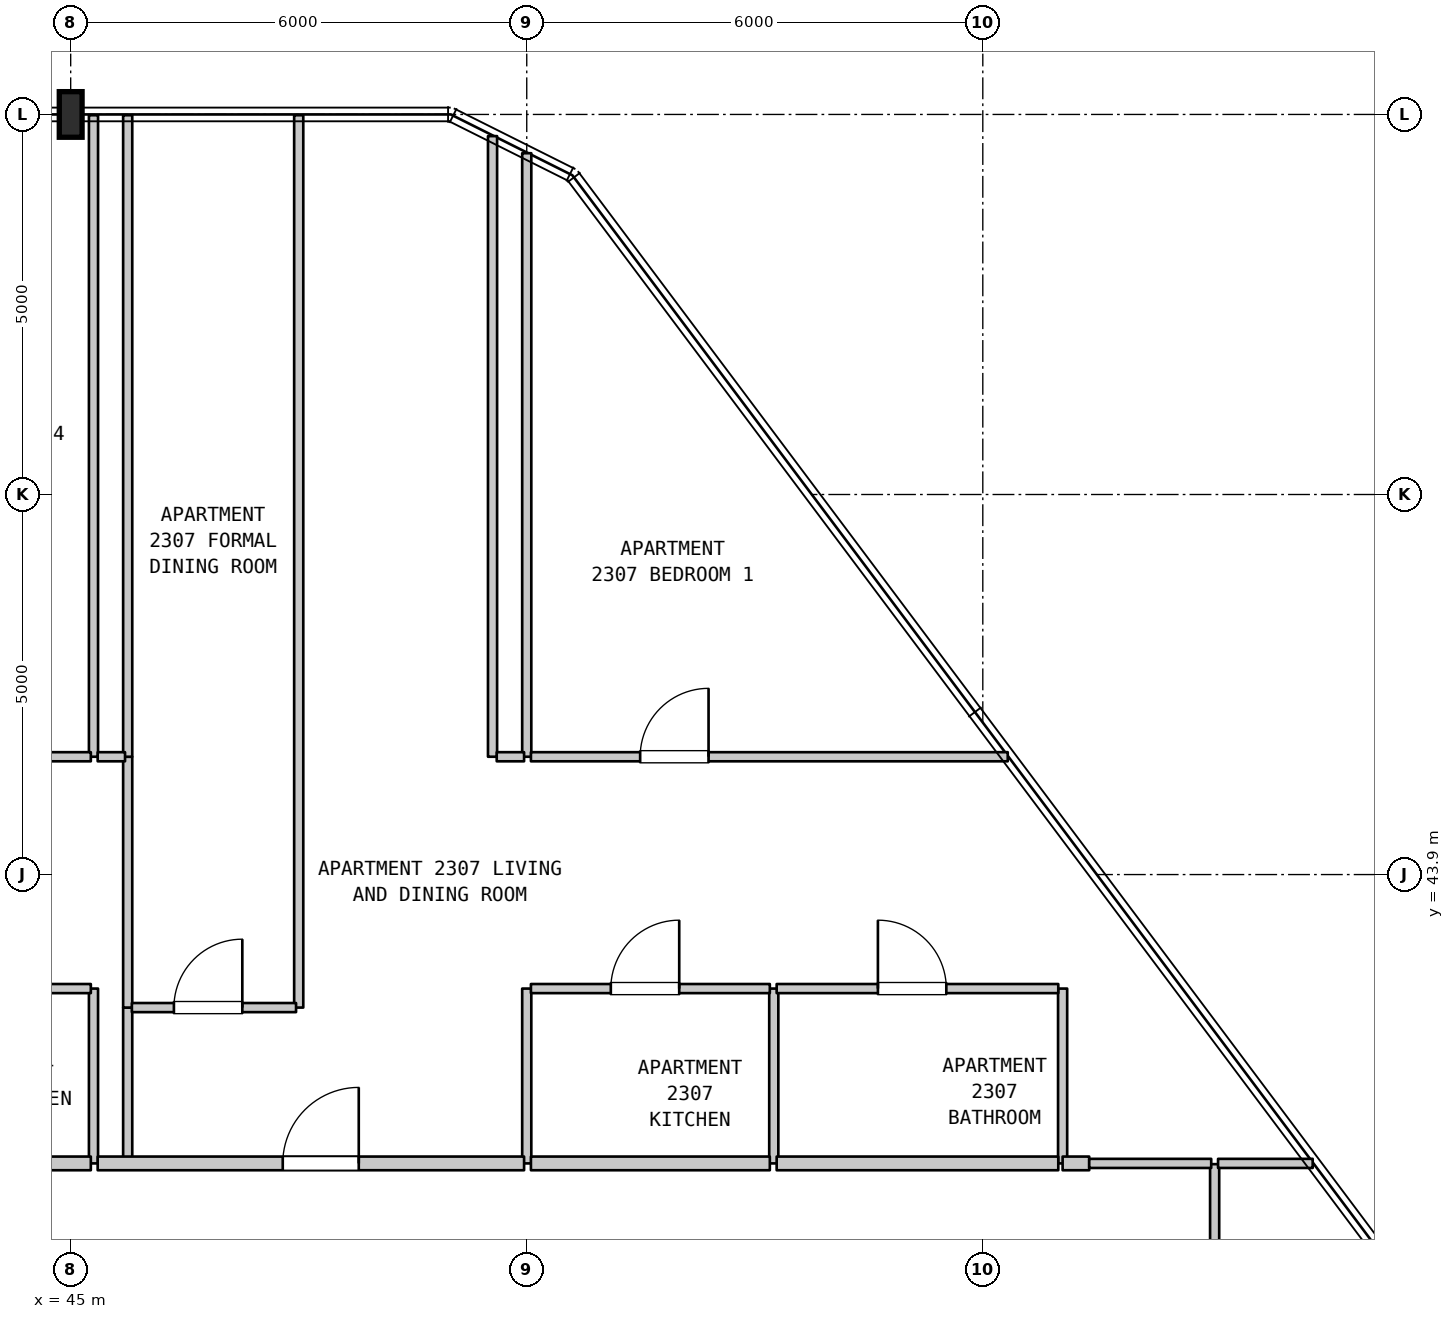
"""IFC4 building model, lengths in metres.
Left out: names, types, materials, properties, quantities, classifications, styles, units other than length and angle.
Written with IfcOpenShell. Run it as: python <this file> out.ifc"""

import sys

from ifc_helpers import new_model, si_unit, direction, frame, frame_2d, origin, origin_2d, place, context, subcontext, project, spatial, rectangle, i_section, extrude, element, fill, save


model = new_model("IFC4")
c1 = context("Model", 3, precision=1e-05, world=origin(), true_north=direction((0.0, 1.0)))
c2 = subcontext(c1, "Body", "Model", "MODEL_VIEW")
j1 = project(units=[si_unit("LENGTHUNIT", "METRE"), si_unit("PLANEANGLEUNIT", "RADIAN")], contexts=[c1])
p1 = place(None, origin())
s1 = spatial("IfcSite", under=j1, at=p1, CompositionType="ELEMENT")
p2 = place(p1, origin())
s2 = spatial("IfcBuilding", under=s1, at=p2, CompositionType="ELEMENT")
p3 = place(p2, frame((0.0, 0.0, 98.3)))
s3 = spatial("IfcBuildingStorey", under=s2, at=p3, CompositionType="ELEMENT", Elevation=98.3)
p4 = place(p3, frame((45.0, 53.9, 0.0), z_axis=(0.0, 0.0, 1.0), x_axis=(1.0, 0.0, 0.0)))
e1 = element("IfcColumn", 1, at=p4, inside=s3, PredefinedType="COLUMN", context=c2, shape_type="SweptSolid", body=[
    extrude(i_section(OverallWidth=0.3, OverallDepth=0.6, WebThickness=0.015, FlangeThickness=0.03, FilletRadius=0.027, at=origin_2d()), origin(), (0.0, 0.0, 1.0), 3.7),
])
p5 = place(p3, frame((45.3, 40.1, 0.0), z_axis=(0.0, 0.0, 1.0), x_axis=(0.0, 1.0, 0.0)))
e2 = element("IfcWall", 2, at=p5, inside=s3, PredefinedType="PARTITIONING", context=c2, shape_type="SweptSolid", body=[
    extrude(rectangle(XDim=2.3, YDim=0.12, at=frame_2d((1.15, 0.0))), origin(), (0.0, 0.0, 1.0), 3.385),
])
p6 = place(p3, frame((45.3, 45.45, 0.0), z_axis=(0.0, 0.0, 1.0), x_axis=(0.0, 1.0, 0.0)))
e3 = element("IfcWall", 3, at=p6, inside=s3, PredefinedType="PARTITIONING", context=c2, shape_type="SweptSolid", body=[
    extrude(rectangle(XDim=8.44, YDim=0.12, at=frame_2d((4.22, 0.0))), origin(), (0.0, 0.0, 1.0), 3.385),
])
p7 = place(p3, frame((45.75, 40.1, 0.0), z_axis=(0.0, 0.0, 1.0), x_axis=(0.0, 1.0, 0.0)))
e4 = element("IfcWall", 4, at=p7, inside=s3, PredefinedType="PARTITIONING", context=c2, shape_type="SweptSolid", body=[
    extrude(rectangle(XDim=2.05, YDim=0.12, at=frame_2d((1.025, 0.0))), origin(), (0.0, 0.0, 1.0), 3.385),
])
p8 = place(p3, frame((45.75, 42.15, 0.0), z_axis=(0.0, 0.0, 1.0), x_axis=(0.0, 1.0, 0.0)))
e5 = element("IfcWall", 5, at=p8, inside=s3, PredefinedType="PARTITIONING", context=c2, shape_type="SweptSolid", body=[
    extrude(rectangle(XDim=3.3, YDim=0.12, at=frame_2d((1.65, 0.0))), origin(), (0.0, 0.0, 1.0), 3.385),
])
p9 = place(p3, frame((45.75, 45.45, 0.0), z_axis=(0.0, 0.0, 1.0), x_axis=(0.0, 1.0, 0.0)))
e6 = element("IfcWall", 6, at=p9, inside=s3, PredefinedType="PARTITIONING", context=c2, shape_type="SweptSolid", body=[
    extrude(rectangle(XDim=8.44, YDim=0.12, at=frame_2d((4.22, 0.0))), origin(), (0.0, 0.0, 1.0), 3.385),
])
p10 = place(p3, frame((48.0, 42.15, 0.0), z_axis=(0.0, 0.0, 1.0), x_axis=(0.0, 1.0, 0.0)))
e7 = element("IfcWall", 7, at=p10, inside=s3, PredefinedType="PARTITIONING", context=c2, shape_type="SweptSolid", body=[
    extrude(rectangle(XDim=11.74, YDim=0.12, at=frame_2d((5.87, 0.0))), origin(), (0.0, 0.0, 1.0), 3.385),
])
p11 = place(p3, frame((50.55, 45.45, 0.0), z_axis=(0.0, 0.0, 1.0), x_axis=(0.0, 1.0, 0.0)))
e8 = element("IfcWall", 8, at=p11, inside=s3, PredefinedType="PARTITIONING", context=c2, shape_type="SweptSolid", body=[
    extrude(rectangle(XDim=8.165, YDim=0.12, at=frame_2d((4.083, 0.0))), origin(), (0.0, 0.0, 1.0), 3.385),
])
p12 = place(p3, frame((51.0, 40.1, 0.0), z_axis=(0.0, 0.0, 1.0), x_axis=(0.0, 1.0, 0.0)))
e9 = element("IfcWall", 9, at=p12, inside=s3, PredefinedType="PARTITIONING", context=c2, shape_type="SweptSolid", body=[
    extrude(rectangle(XDim=2.3, YDim=0.12, at=frame_2d((1.15, 0.0))), origin(), (0.0, 0.0, 1.0), 3.385),
])
p13 = place(p3, frame((51.0, 45.45, 0.0), z_axis=(0.0, 0.0, 1.0), x_axis=(0.0, 1.0, 0.0)))
e10 = element("IfcWall", 10, at=p13, inside=s3, PredefinedType="PARTITIONING", context=c2, shape_type="SweptSolid", body=[
    extrude(rectangle(XDim=7.94, YDim=0.12, at=frame_2d((3.97, 0.0))), origin(), (0.0, 0.0, 1.0), 3.385),
])
for number, where, z_axis, x_axis in (
    (11, (54.25, 40.1, 0.0), (0.0, 0.0, 1.0), (0.0, 1.0, 0.0)),
    (12, (58.05, 40.1, 0.0), (0.0, 0.0, 1.0), (0.0, 1.0, 0.0)),
):
    element("IfcWall", number, at=place(p3, frame(where, z_axis=z_axis, x_axis=x_axis)), inside=s3, PredefinedType="PARTITIONING", context=c2, shape_type="SweptSolid", body=[
        extrude(rectangle(XDim=2.3, YDim=0.12, at=frame_2d((1.15, 0.0))), origin(), (0.0, 0.0, 1.0), 3.385),
    ])
p14 = place(p3, frame((60.05, 37.89, 0.0), z_axis=(0.0, 0.0, 1.0), x_axis=(0.0, 1.0, 0.0)))
e13 = element("IfcWall", 13, at=p14, inside=s3, PredefinedType="PARTITIONING", context=c2, shape_type="SweptSolid", body=[
    extrude(rectangle(XDim=2.2, YDim=0.12, at=frame_2d((1.1, 0.0))), origin(), (0.0, 0.0, 1.0), 3.385),
])
p15 = place(p3, frame((40.968, 40.1, 0.0), z_axis=(0.0, 0.0, 1.0), x_axis=(1.0, 0.0, 0.0)))
e14 = element("IfcWall", 14, at=p15, inside=s3, PredefinedType="STANDARD", context=c2, shape_type="SweptSolid", body=[
    extrude(rectangle(XDim=4.297, YDim=0.18, at=frame_2d((2.148, 0.0))), origin(), (0.0, 0.0, 1.0), 3.385),
])
p16 = place(p3, frame((45.355, 40.1, 0.0), z_axis=(0.0, 0.0, 1.0), x_axis=(1.0, 0.0, 0.0)))
e15 = element("IfcWall", 15, at=p16, inside=s3, PredefinedType="STANDARD", context=c2, shape_type="SweptSolid", body=[
    extrude(rectangle(XDim=5.61, YDim=0.18, at=frame_2d((2.805, 0.0))), origin(), (0.0, 0.0, 1.0), 3.385),
])
p17 = place(p16, frame((2.435, 0.0, 0.0)))
e16 = element("IfcOpeningElement", 16, at=p17, cuts=e15, PredefinedType="OPENING", context=c2, shape_type="SweptSolid", body=[
    extrude(rectangle(XDim=1.0, YDim=2.15, at=frame_2d((0.5, 1.075))), frame((0.0, 0.1, 0.0), z_axis=(0.0, -1.0, 0.0), x_axis=(1.0, 0.0, 0.0)), (0.0, 0.0, 1.0), 0.2),
])
p18 = place(p3, frame((51.055, 40.1, 0.0), z_axis=(0.0, 0.0, 1.0), x_axis=(1.0, 0.0, 0.0)))
e17 = element("IfcWall", 17, at=p18, inside=s3, PredefinedType="STANDARD", context=c2, shape_type="SweptSolid", body=[
    extrude(rectangle(XDim=3.143, YDim=0.18, at=frame_2d((1.572, 0.0))), origin(), (0.0, 0.0, 1.0), 3.385),
])
p19 = place(p3, frame((54.288, 40.1, 0.0), z_axis=(0.0, 0.0, 1.0), x_axis=(1.0, 0.0, 0.0)))
e18 = element("IfcWall", 18, at=p19, inside=s3, PredefinedType="STANDARD", context=c2, shape_type="SweptSolid", body=[
    extrude(rectangle(XDim=3.705, YDim=0.18, at=frame_2d((1.853, 0.0))), origin(), (0.0, 0.0, 1.0), 3.385),
])
p20 = place(p3, frame((58.05, 40.1, 0.0), z_axis=(0.0, 0.0, 1.0), x_axis=(1.0, 0.0, 0.0)))
e19 = element("IfcWall", 19, at=p20, inside=s3, PredefinedType="STANDARD", context=c2, shape_type="SweptSolid", body=[
    extrude(rectangle(XDim=0.35, YDim=0.18, at=frame_2d((0.175, 0.0))), origin(), (0.0, 0.0, 1.0), 3.385),
])
p21 = place(p3, frame((58.4, 40.1, 0.0), z_axis=(0.0, 0.0, 1.0), x_axis=(1.0, 0.0, 0.0)))
e20 = element("IfcWall", 20, at=p21, inside=s3, PredefinedType="PARTITIONING", context=c2, shape_type="SweptSolid", body=[
    extrude(rectangle(XDim=1.605, YDim=0.12, at=frame_2d((0.802, 0.0))), origin(), (0.0, 0.0, 1.0), 3.385),
])
p22 = place(p3, frame((60.095, 40.1, 0.0), z_axis=(0.0, 0.0, 1.0), x_axis=(1.0, 0.0, 0.0)))
e21 = element("IfcWall", 21, at=p22, inside=s3, PredefinedType="PARTITIONING", context=c2, shape_type="SweptSolid", body=[
    extrude(rectangle(XDim=1.245, YDim=0.12, at=frame_2d((0.623, 0.0))), origin(), (0.0, 0.0, 1.0), 3.385),
])
p23 = place(p3, frame((45.805, 42.15, 0.0), z_axis=(0.0, 0.0, 1.0), x_axis=(1.0, 0.0, 0.0)))
e22 = element("IfcWall", 22, at=p23, inside=s3, PredefinedType="PARTITIONING", context=c2, shape_type="SweptSolid", body=[
    extrude(rectangle(XDim=2.16, YDim=0.12, at=frame_2d((1.08, 0.0))), origin(), (0.0, 0.0, 1.0), 3.385),
])
p24 = place(p23, frame((0.553, 0.0, 0.0)))
e23 = element("IfcOpeningElement", 23, at=p24, cuts=e22, PredefinedType="OPENING", context=c2, shape_type="SweptSolid", body=[
    extrude(rectangle(XDim=0.9, YDim=2.15, at=frame_2d((0.45, 1.075))), frame((0.0, 0.07, 0.0), z_axis=(0.0, -1.0, 0.0), x_axis=(1.0, 0.0, 0.0)), (0.0, 0.0, 1.0), 0.14),
])
p25 = place(p3, frame((40.968, 42.4, 0.0), z_axis=(0.0, 0.0, 1.0), x_axis=(1.0, 0.0, 0.0)))
e24 = element("IfcWall", 24, at=p25, inside=s3, PredefinedType="PARTITIONING", context=c2, shape_type="SweptSolid", body=[
    extrude(rectangle(XDim=4.297, YDim=0.12, at=frame_2d((2.148, 0.0))), origin(), (0.0, 0.0, 1.0), 3.385),
])
p26 = place(p25, frame((1.627, 0.0, 0.0)))
e25 = element("IfcOpeningElement", 25, at=p26, cuts=e24, PredefinedType="OPENING", context=c2, shape_type="SweptSolid", body=[
    extrude(rectangle(XDim=0.9, YDim=2.15, at=frame_2d((0.45, 1.075))), frame((0.0, 0.07, 0.0), z_axis=(0.0, -1.0, 0.0), x_axis=(1.0, 0.0, 0.0)), (0.0, 0.0, 1.0), 0.14),
])
p27 = place(p3, frame((51.055, 42.4, 0.0), z_axis=(0.0, 0.0, 1.0), x_axis=(1.0, 0.0, 0.0)))
e26 = element("IfcWall", 26, at=p27, inside=s3, PredefinedType="PARTITIONING", context=c2, shape_type="SweptSolid", body=[
    extrude(rectangle(XDim=3.143, YDim=0.12, at=frame_2d((1.572, 0.0))), origin(), (0.0, 0.0, 1.0), 3.385),
])
p28 = place(p27, frame((1.051, 0.0, 0.0)))
e27 = element("IfcOpeningElement", 27, at=p28, cuts=e26, PredefinedType="OPENING", context=c2, shape_type="SweptSolid", body=[
    extrude(rectangle(XDim=0.9, YDim=2.15, at=frame_2d((0.45, 1.075))), frame((0.0, 0.07, 0.0), z_axis=(0.0, -1.0, 0.0), x_axis=(1.0, 0.0, 0.0)), (0.0, 0.0, 1.0), 0.14),
])
p29 = place(p3, frame((54.288, 42.4, 0.0), z_axis=(0.0, 0.0, 1.0), x_axis=(1.0, 0.0, 0.0)))
e28 = element("IfcWall", 28, at=p29, inside=s3, PredefinedType="PARTITIONING", context=c2, shape_type="SweptSolid", body=[
    extrude(rectangle(XDim=3.705, YDim=0.12, at=frame_2d((1.853, 0.0))), origin(), (0.0, 0.0, 1.0), 3.385),
])
p30 = place(p29, frame((1.332, 0.0, 0.0)))
e29 = element("IfcOpeningElement", 29, at=p30, cuts=e28, PredefinedType="OPENING", context=c2, shape_type="SweptSolid", body=[
    extrude(rectangle(XDim=0.9, YDim=2.1, at=frame_2d((0.45, 1.05))), frame((0.0, 0.07, 0.0), z_axis=(0.0, -1.0, 0.0), x_axis=(1.0, 0.0, 0.0)), (0.0, 0.0, 1.0), 0.14),
])
p31 = place(p3, frame((33.625, 45.45, 0.0), z_axis=(0.0, 0.0, 1.0), x_axis=(1.0, 0.0, 0.0)))
e30 = element("IfcWall", 30, at=p31, inside=s3, PredefinedType="PARTITIONING", context=c2, shape_type="SweptSolid", body=[
    extrude(rectangle(XDim=11.64, YDim=0.12, at=frame_2d((5.82, 0.0))), origin(), (0.0, 0.0, 1.0), 3.385),
])
p32 = place(p31, frame((1.146, 0.0, 0.0)))
e31 = element("IfcOpeningElement", 31, at=p32, cuts=e30, PredefinedType="OPENING", context=c2, shape_type="SweptSolid", body=[
    extrude(rectangle(XDim=0.9, YDim=2.15, at=frame_2d((0.45, 1.075))), frame((0.0, 0.07, 0.0), z_axis=(0.0, -1.0, 0.0), x_axis=(1.0, 0.0, 0.0)), (0.0, 0.0, 1.0), 0.14),
])
p33 = place(p31, frame((3.834, 0.0, 0.0)))
e32 = element("IfcOpeningElement", 32, at=p33, cuts=e30, PredefinedType="OPENING", context=c2, shape_type="SweptSolid", body=[
    extrude(rectangle(XDim=0.9, YDim=2.15, at=frame_2d((0.45, 1.075))), frame((0.0, 0.07, 0.0), z_axis=(0.0, -1.0, 0.0), x_axis=(1.0, 0.0, 0.0)), (0.0, 0.0, 1.0), 0.14),
])
p34 = place(p31, frame((6.766, 0.0, 0.0)))
e33 = element("IfcOpeningElement", 33, at=p34, cuts=e30, PredefinedType="OPENING", context=c2, shape_type="SweptSolid", body=[
    extrude(rectangle(XDim=0.9, YDim=2.15, at=frame_2d((0.45, 1.075))), frame((0.0, 0.07, 0.0), z_axis=(0.0, -1.0, 0.0), x_axis=(1.0, 0.0, 0.0)), (0.0, 0.0, 1.0), 0.14),
])
p35 = place(p31, frame((9.594, 0.0, 0.0)))
e34 = element("IfcOpeningElement", 34, at=p35, cuts=e30, PredefinedType="OPENING", context=c2, shape_type="SweptSolid", body=[
    extrude(rectangle(XDim=0.9, YDim=2.15, at=frame_2d((0.45, 1.075))), frame((0.0, 0.07, 0.0), z_axis=(0.0, -1.0, 0.0), x_axis=(1.0, 0.0, 0.0)), (0.0, 0.0, 1.0), 0.14),
])
for number, where, z_axis, x_axis in (
    (35, (45.355, 45.45, 0.0), (0.0, 0.0, 1.0), (1.0, 0.0, 0.0)),
    (36, (50.605, 45.45, 0.0), (0.0, 0.0, 1.0), (1.0, 0.0, 0.0)),
):
    element("IfcWall", number, at=place(p3, frame(where, z_axis=z_axis, x_axis=x_axis)), inside=s3, PredefinedType="PARTITIONING", context=c2, shape_type="SweptSolid", body=[
        extrude(rectangle(XDim=0.36, YDim=0.12, at=frame_2d((0.18, 0.0))), origin(), (0.0, 0.0, 1.0), 3.385),
    ])
p36 = place(p3, frame((51.055, 45.45, 0.0), z_axis=(0.0, 0.0, 1.0), x_axis=(1.0, 0.0, 0.0)))
e37 = element("IfcWall", 37, at=p36, inside=s3, PredefinedType="PARTITIONING", context=c2, shape_type="SweptSolid", body=[
    extrude(rectangle(XDim=6.273, YDim=0.12, at=frame_2d((3.136, 0.0))), origin(), (0.0, 0.0, 1.0), 3.385),
])
p37 = place(p36, frame((1.437, 0.0, 0.0)))
e38 = element("IfcOpeningElement", 38, at=p37, cuts=e37, PredefinedType="OPENING", context=c2, shape_type="SweptSolid", body=[
    extrude(rectangle(XDim=0.9, YDim=2.15, at=frame_2d((0.45, 1.075))), frame((0.0, 0.07, 0.0), z_axis=(0.0, -1.0, 0.0), x_axis=(1.0, 0.0, 0.0)), (0.0, 0.0, 1.0), 0.14),
])
p38 = place(p17, origin())
e39 = element("IfcDoor", 39, at=p38, inside=s3, OperationType="SINGLE_SWING_RIGHT", PredefinedType="DOOR", context=c2, shape_type="SweptSolid", body=[
    extrude(rectangle(XDim=1.0, YDim=2.15, at=frame_2d((0.5, 1.075))), frame((0.0, 0.025, 0.0), z_axis=(0.0, -1.0, 0.0), x_axis=(1.0, 0.0, 0.0)), (0.0, 0.0, 1.0), 0.05),
])
fill(e16, e39)
p39 = place(p24, origin())
e40 = element("IfcDoor", 40, at=p39, inside=s3, OperationType="SINGLE_SWING_RIGHT", PredefinedType="DOOR", context=c2, shape_type="SweptSolid", body=[
    extrude(rectangle(XDim=0.9, YDim=2.15, at=frame_2d((0.45, 1.075))), frame((0.0, 0.025, 0.0), z_axis=(0.0, -1.0, 0.0), x_axis=(1.0, 0.0, 0.0)), (0.0, 0.0, 1.0), 0.05),
])
fill(e23, e40)
p40 = place(p28, origin())
e41 = element("IfcDoor", 41, at=p40, inside=s3, OperationType="SINGLE_SWING_RIGHT", PredefinedType="DOOR", context=c2, shape_type="SweptSolid", body=[
    extrude(rectangle(XDim=0.9, YDim=2.15, at=frame_2d((0.45, 1.075))), frame((0.0, 0.025, 0.0), z_axis=(0.0, -1.0, 0.0), x_axis=(1.0, 0.0, 0.0)), (0.0, 0.0, 1.0), 0.05),
])
fill(e27, e41)
p41 = place(p30, origin())
e42 = element("IfcDoor", 42, at=p41, inside=s3, OperationType="SINGLE_SWING_LEFT", PredefinedType="DOOR", context=c2, shape_type="SweptSolid", body=[
    extrude(rectangle(XDim=0.9, YDim=2.1, at=frame_2d((0.45, 1.05))), frame((0.0, 0.025, 0.0), z_axis=(0.0, -1.0, 0.0), x_axis=(1.0, 0.0, 0.0)), (0.0, 0.0, 1.0), 0.05),
])
fill(e29, e42)
p42 = place(p37, origin())
e43 = element("IfcDoor", 43, at=p42, inside=s3, OperationType="SINGLE_SWING_RIGHT", PredefinedType="DOOR", context=c2, shape_type="SweptSolid", body=[
    extrude(rectangle(XDim=0.9, YDim=2.15, at=frame_2d((0.45, 1.075))), frame((0.0, 0.025, 0.0), z_axis=(0.0, -1.0, 0.0), x_axis=(1.0, 0.0, 0.0)), (0.0, 0.0, 1.0), 0.05),
])
fill(e38, e43)
save(model, sys.argv[1])
